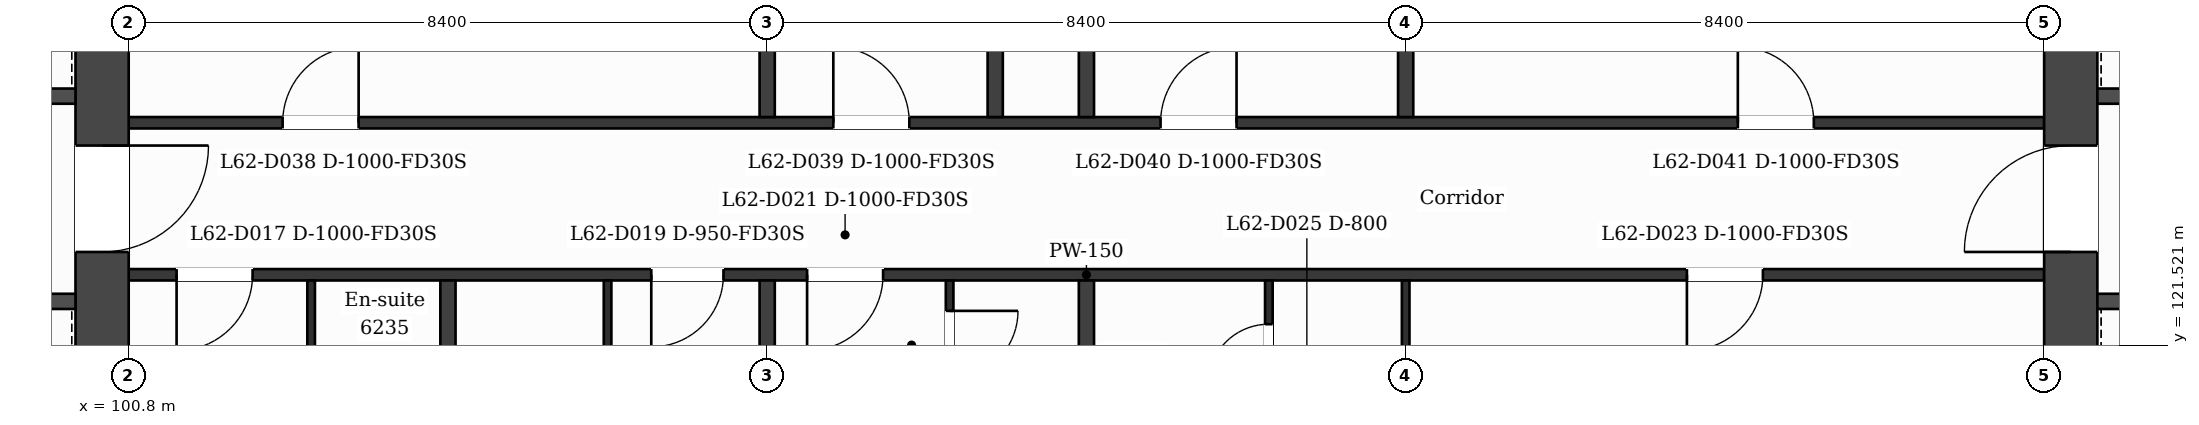
"""IFC4 building model, lengths in metres.
Left out: names, types, materials, properties, quantities, classifications, styles, units other than length and angle.
Written with IfcOpenShell. Run it as: python <this file> out.ifc"""

import sys

from ifc_helpers import new_model, si_unit, direction, frame, frame_2d, origin, place, context, subcontext, project, spatial, rectangle, extrude, element, fill, save


model = new_model("IFC4")
c1 = context("Model", 3, precision=1e-05, world=origin(), true_north=direction((0.0, 1.0)))
c2 = subcontext(c1, "Body", "Model", "MODEL_VIEW")
j1 = project(units=[si_unit("LENGTHUNIT", "METRE"), si_unit("PLANEANGLEUNIT", "RADIAN")], contexts=[c1])
p1 = place(None, origin())
s1 = spatial("IfcSite", under=j1, at=p1, CompositionType="ELEMENT")
p2 = place(p1, origin())
s2 = spatial("IfcBuilding", under=s1, at=p2, CompositionType="ELEMENT")
p3 = place(p2, frame((0.0, 0.0, 259.0)))
s3 = spatial("IfcBuildingStorey", under=s2, at=p3, CompositionType="ELEMENT", Elevation=259.0)
p4 = place(p3, frame((100.45, 132.05, 0.0), z_axis=(0.0, 0.0, 1.0), x_axis=(0.0, -1.0, 0.0)))
e1 = element("IfcWall", 1, at=p4, inside=s3, PredefinedType="SHEAR", context=c2, shape_type="SweptSolid", body=[
    extrude(rectangle(XDim=21.3, YDim=0.7, at=frame_2d((10.65, 0.0))), origin(), (0.0, 0.0, 1.0), 3.7),
])
p5 = place(p4, frame((7.9, 0.0, 0.0)))
e2 = element("IfcOpeningElement", 2, at=p5, cuts=e1, PredefinedType="OPENING", context=c2, shape_type="SweptSolid", body=[
    extrude(rectangle(XDim=1.4, YDim=2.1, at=frame_2d((0.7, 1.05))), frame((0.0, 0.36, 0.0), z_axis=(0.0, -1.0, 0.0), x_axis=(1.0, 0.0, 0.0)), (0.0, 0.0, 1.0), 0.72),
])
p6 = place(p3, frame((126.35, 110.75, 0.0), z_axis=(0.0, 0.0, 1.0), x_axis=(0.0, 1.0, 0.0)))
e3 = element("IfcWall", 3, at=p6, inside=s3, PredefinedType="SHEAR", context=c2, shape_type="SweptSolid", body=[
    extrude(rectangle(XDim=21.3, YDim=0.7, at=frame_2d((10.65, 0.0))), origin(), (0.0, 0.0, 1.0), 3.7),
])
p7 = place(p6, frame((12.0, 0.0, 0.0)))
e4 = element("IfcOpeningElement", 4, at=p7, cuts=e3, PredefinedType="OPENING", context=c2, shape_type="SweptSolid", body=[
    extrude(rectangle(XDim=1.4, YDim=2.1, at=frame_2d((0.7, 1.05))), frame((0.0, 0.36, 0.0), z_axis=(0.0, -1.0, 0.0), x_axis=(1.0, 0.0, 0.0)), (0.0, 0.0, 1.0), 0.72),
])
p8 = place(p3, frame((95.227, 122.1, 0.0), z_axis=(0.0, 0.0, 1.0), x_axis=(1.0, 0.0, 0.0)))
e5 = element("IfcWall", 5, at=p8, inside=s3, PredefinedType="PARTITIONING", context=c2, shape_type="SweptSolid", body=[
    extrude(rectangle(XDim=4.873, YDim=0.2, at=frame_2d((2.437, 0.0))), origin(), (0.0, 0.0, 1.0), 3.38),
])
p9 = place(p8, frame((0.827, 0.0, 0.0)))
e6 = element("IfcOpeningElement", 6, at=p9, cuts=e5, PredefinedType="OPENING", context=c2, shape_type="SweptSolid", body=[
    extrude(rectangle(XDim=1.1, YDim=2.1, at=frame_2d((0.55, 1.05))), frame((0.0, 0.11, 0.0), z_axis=(0.0, -1.0, 0.0), x_axis=(1.0, 0.0, 0.0)), (0.0, 0.0, 1.0), 0.22),
])
p10 = place(p8, frame((2.946, 0.0, 0.0)))
e7 = element("IfcOpeningElement", 7, at=p10, cuts=e5, PredefinedType="OPENING", context=c2, shape_type="SweptSolid", body=[
    extrude(rectangle(XDim=1.1, YDim=2.1, at=frame_2d((0.55, 1.05))), frame((0.0, 0.11, 0.0), z_axis=(0.0, -1.0, 0.0), x_axis=(1.0, 0.0, 0.0)), (0.0, 0.0, 1.0), 0.22),
])
p11 = place(p3, frame((126.7, 122.1, 0.0), z_axis=(0.0, 0.0, 1.0), x_axis=(1.0, 0.0, 0.0)))
e8 = element("IfcWall", 8, at=p11, inside=s3, PredefinedType="PARTITIONING", context=c2, shape_type="SweptSolid", body=[
    extrude(rectangle(XDim=4.873, YDim=0.2, at=frame_2d((2.437, 0.0))), origin(), (0.0, 0.0, 1.0), 3.38),
])
p12 = place(p11, frame((3.041, 0.0, 0.0)))
e9 = element("IfcOpeningElement", 9, at=p12, cuts=e8, PredefinedType="OPENING", context=c2, shape_type="SweptSolid", body=[
    extrude(rectangle(XDim=1.1, YDim=2.1, at=frame_2d((0.55, 1.05))), frame((0.0, 0.11, 0.0), z_axis=(0.0, -1.0, 0.0), x_axis=(1.0, 0.0, 0.0)), (0.0, 0.0, 1.0), 0.22),
])
p13 = place(p11, frame((0.732, 0.0, 0.0)))
e10 = element("IfcOpeningElement", 10, at=p13, cuts=e8, PredefinedType="OPENING", context=c2, shape_type="SweptSolid", body=[
    extrude(rectangle(XDim=1.1, YDim=2.1, at=frame_2d((0.55, 1.05))), frame((0.0, 0.11, 0.0), z_axis=(0.0, -1.0, 0.0), x_axis=(1.0, 0.0, 0.0)), (0.0, 0.0, 1.0), 0.22),
])
p14 = place(p3, frame((100.8, 122.45, 0.0), z_axis=(0.0, 0.0, 1.0), x_axis=(1.0, 0.0, 0.0)))
e11 = element("IfcWall", 11, at=p14, inside=s3, PredefinedType="PARTITIONING", context=c2, shape_type="SweptSolid", body=[
    extrude(rectangle(XDim=25.2, YDim=0.15, at=frame_2d((12.6, 0.0))), origin(), (0.0, 0.0, 1.0), 3.38),
])
p15 = place(p14, frame((0.63, 0.0, 0.0)))
e12 = element("IfcOpeningElement", 12, at=p15, cuts=e11, PredefinedType="OPENING", context=c2, shape_type="SweptSolid", body=[
    extrude(rectangle(XDim=1.0, YDim=2.1, at=frame_2d((0.5, 1.05))), frame((0.0, 0.085, 0.0), z_axis=(0.0, -1.0, 0.0), x_axis=(1.0, 0.0, 0.0)), (0.0, 0.0, 1.0), 0.17),
])
p16 = place(p14, frame((6.875, 0.0, 0.0)))
e13 = element("IfcOpeningElement", 13, at=p16, cuts=e11, PredefinedType="OPENING", context=c2, shape_type="SweptSolid", body=[
    extrude(rectangle(XDim=0.95, YDim=2.1, at=frame_2d((0.475, 1.05))), frame((0.0, 0.085, 0.0), z_axis=(0.0, -1.0, 0.0), x_axis=(1.0, 0.0, 0.0)), (0.0, 0.0, 1.0), 0.17),
])
p17 = place(p14, frame((8.925, 0.0, 0.0)))
e14 = element("IfcOpeningElement", 14, at=p17, cuts=e11, PredefinedType="OPENING", context=c2, shape_type="SweptSolid", body=[
    extrude(rectangle(XDim=1.0, YDim=2.1, at=frame_2d((0.5, 1.05))), frame((0.0, 0.085, 0.0), z_axis=(0.0, -1.0, 0.0), x_axis=(1.0, 0.0, 0.0)), (0.0, 0.0, 1.0), 0.17),
])
p18 = place(p14, frame((20.5, 0.0, 0.0)))
e15 = element("IfcOpeningElement", 15, at=p18, cuts=e11, PredefinedType="OPENING", context=c2, shape_type="SweptSolid", body=[
    extrude(rectangle(XDim=1.0, YDim=2.1, at=frame_2d((0.5, 1.05))), frame((0.0, 0.085, 0.0), z_axis=(0.0, -1.0, 0.0), x_axis=(1.0, 0.0, 0.0)), (0.0, 0.0, 1.0), 0.17),
])
p19 = place(p3, frame((100.8, 124.45, 0.0), z_axis=(0.0, 0.0, 1.0), x_axis=(1.0, 0.0, 0.0)))
e16 = element("IfcWall", 16, at=p19, inside=s3, PredefinedType="PARTITIONING", context=c2, shape_type="SweptSolid", body=[
    extrude(rectangle(XDim=25.2, YDim=0.15, at=frame_2d((12.6, 0.0))), origin(), (0.0, 0.0, 1.0), 3.38),
])
p20 = place(p19, frame((2.025, 0.0, 0.0)))
e17 = element("IfcOpeningElement", 17, at=p20, cuts=e16, PredefinedType="OPENING", context=c2, shape_type="SweptSolid", body=[
    extrude(rectangle(XDim=1.0, YDim=2.1, at=frame_2d((0.5, 1.05))), frame((0.0, 0.085, 0.0), z_axis=(0.0, -1.0, 0.0), x_axis=(1.0, 0.0, 0.0)), (0.0, 0.0, 1.0), 0.17),
])
p21 = place(p19, frame((9.27, 0.0, 0.0)))
e18 = element("IfcOpeningElement", 18, at=p21, cuts=e16, PredefinedType="OPENING", context=c2, shape_type="SweptSolid", body=[
    extrude(rectangle(XDim=1.0, YDim=2.1, at=frame_2d((0.5, 1.05))), frame((0.0, 0.085, 0.0), z_axis=(0.0, -1.0, 0.0), x_axis=(1.0, 0.0, 0.0)), (0.0, 0.0, 1.0), 0.17),
])
p22 = place(p19, frame((13.575, 0.0, 0.0)))
e19 = element("IfcOpeningElement", 19, at=p22, cuts=e16, PredefinedType="OPENING", context=c2, shape_type="SweptSolid", body=[
    extrude(rectangle(XDim=1.0, YDim=2.1, at=frame_2d((0.5, 1.05))), frame((0.0, 0.085, 0.0), z_axis=(0.0, -1.0, 0.0), x_axis=(1.0, 0.0, 0.0)), (0.0, 0.0, 1.0), 0.17),
])
p23 = place(p19, frame((21.17, 0.0, 0.0)))
e20 = element("IfcOpeningElement", 20, at=p23, cuts=e16, PredefinedType="OPENING", context=c2, shape_type="SweptSolid", body=[
    extrude(rectangle(XDim=1.0, YDim=2.1, at=frame_2d((0.5, 1.05))), frame((0.0, 0.085, 0.0), z_axis=(0.0, -1.0, 0.0), x_axis=(1.0, 0.0, 0.0)), (0.0, 0.0, 1.0), 0.17),
])
p24 = place(p3, frame((92.702, 124.8, 0.0), z_axis=(0.0, 0.0, 1.0), x_axis=(1.0, 0.0, 0.0)))
e21 = element("IfcWall", 21, at=p24, inside=s3, PredefinedType="PARTITIONING", context=c2, shape_type="SweptSolid", body=[
    extrude(rectangle(XDim=7.398, YDim=0.2, at=frame_2d((3.699, 0.0))), origin(), (0.0, 0.0, 1.0), 3.38),
])
p25 = place(p24, frame((5.636, 0.0, 0.0)))
e22 = element("IfcOpeningElement", 22, at=p25, cuts=e21, PredefinedType="OPENING", context=c2, shape_type="SweptSolid", body=[
    extrude(rectangle(XDim=1.1, YDim=2.1, at=frame_2d((0.55, 1.05))), frame((0.0, 0.11, 0.0), z_axis=(0.0, -1.0, 0.0), x_axis=(1.0, 0.0, 0.0)), (0.0, 0.0, 1.0), 0.22),
])
p26 = place(p3, frame((126.7, 124.8, 0.0), z_axis=(0.0, 0.0, 1.0), x_axis=(1.0, 0.0, 0.0)))
e23 = element("IfcWall", 23, at=p26, inside=s3, PredefinedType="PARTITIONING", context=c2, shape_type="SweptSolid", body=[
    extrude(rectangle(XDim=4.849, YDim=0.2, at=frame_2d((2.424, 0.0))), origin(), (0.0, 0.0, 1.0), 3.38),
])
p27 = place(p26, frame((0.506, 0.0, 0.0)))
e24 = element("IfcOpeningElement", 24, at=p27, cuts=e23, PredefinedType="OPENING", context=c2, shape_type="SweptSolid", body=[
    extrude(rectangle(XDim=1.1, YDim=2.1, at=frame_2d((0.55, 1.05))), frame((0.0, 0.11, 0.0), z_axis=(0.0, -1.0, 0.0), x_axis=(1.0, 0.0, 0.0)), (0.0, 0.0, 1.0), 0.22),
])
p28 = place(p3, frame((103.2, 119.8, 0.0), z_axis=(0.0, 0.0, 1.0), x_axis=(0.0, 1.0, 0.0)))
e25 = element("IfcWall", 25, at=p28, inside=s3, PredefinedType="PARTITIONING", context=c2, shape_type="SweptSolid", body=[
    extrude(rectangle(XDim=2.575, YDim=0.1, at=frame_2d((1.288, 0.0))), origin(), (0.0, 0.0, 1.0), 3.38),
])
p29 = place(p28, frame((0.74, 0.0, 0.0)))
e26 = element("IfcOpeningElement", 26, at=p29, cuts=e25, PredefinedType="OPENING", context=c2, shape_type="SweptSolid", body=[
    extrude(rectangle(XDim=0.9, YDim=2.1, at=frame_2d((0.45, 1.05))), frame((0.0, 0.06, 0.0), z_axis=(0.0, -1.0, 0.0), x_axis=(1.0, 0.0, 0.0)), (0.0, 0.0, 1.0), 0.12),
])
p30 = place(p3, frame((105.0, 110.55, 0.0), z_axis=(0.0, 0.0, 1.0), x_axis=(0.0, 1.0, 0.0)))
e27 = element("IfcWall", 27, at=p30, inside=s3, PredefinedType="PARTITIONING", context=c2, shape_type="SweptSolid", body=[
    extrude(rectangle(XDim=11.825, YDim=0.2, at=frame_2d((5.913, 0.0))), origin(), (0.0, 0.0, 1.0), 3.38),
])
p31 = place(p3, frame((107.1, 119.8, 0.0), z_axis=(0.0, 0.0, 1.0), x_axis=(0.0, 1.0, 0.0)))
e28 = element("IfcWall", 28, at=p31, inside=s3, PredefinedType="PARTITIONING", context=c2, shape_type="SweptSolid", body=[
    extrude(rectangle(XDim=2.575, YDim=0.1, at=frame_2d((1.288, 0.0))), origin(), (0.0, 0.0, 1.0), 3.38),
])
p32 = place(p31, frame((0.9, 0.0, 0.0)))
e29 = element("IfcOpeningElement", 29, at=p32, cuts=e28, PredefinedType="OPENING", context=c2, shape_type="SweptSolid", body=[
    extrude(rectangle(XDim=0.8, YDim=2.1, at=frame_2d((0.4, 1.05))), frame((0.0, 0.06, 0.0), z_axis=(0.0, -1.0, 0.0), x_axis=(1.0, 0.0, 0.0)), (0.0, 0.0, 1.0), 0.12),
])
p33 = place(p3, frame((109.2, 110.55, 0.0), z_axis=(0.0, 0.0, 1.0), x_axis=(0.0, 1.0, 0.0)))
e30 = element("IfcWall", 30, at=p33, inside=s3, PredefinedType="PARTITIONING", context=c2, shape_type="SweptSolid", body=[
    extrude(rectangle(XDim=11.825, YDim=0.2, at=frame_2d((5.913, 0.0))), origin(), (0.0, 0.0, 1.0), 3.38),
])
p34 = place(p3, frame((109.2, 124.525, 0.0), z_axis=(0.0, 0.0, 1.0), x_axis=(0.0, 1.0, 0.0)))
e31 = element("IfcWall", 31, at=p34, inside=s3, PredefinedType="PARTITIONING", context=c2, shape_type="SweptSolid", body=[
    extrude(rectangle(XDim=9.2, YDim=0.2, at=frame_2d((4.6, 0.0))), origin(), (0.0, 0.0, 1.0), 3.38),
])
p35 = place(p3, frame((111.6, 120.4, 0.0), z_axis=(0.0, 0.0, 1.0), x_axis=(0.0, 1.0, 0.0)))
e32 = element("IfcWall", 32, at=p35, inside=s3, PredefinedType="PARTITIONING", context=c2, shape_type="SweptSolid", body=[
    extrude(rectangle(XDim=1.975, YDim=0.1, at=frame_2d((0.988, 0.0))), origin(), (0.0, 0.0, 1.0), 3.38),
])
p36 = place(p35, frame((0.675, 0.0, 0.0)))
e33 = element("IfcOpeningElement", 33, at=p36, cuts=e32, PredefinedType="OPENING", context=c2, shape_type="SweptSolid", body=[
    extrude(rectangle(XDim=0.9, YDim=2.1, at=frame_2d((0.45, 1.05))), frame((0.0, 0.06, 0.0), z_axis=(0.0, -1.0, 0.0), x_axis=(1.0, 0.0, 0.0)), (0.0, 0.0, 1.0), 0.12),
])
p37 = place(p3, frame((112.2, 124.525, 0.0), z_axis=(0.0, 0.0, 1.0), x_axis=(0.0, 1.0, 0.0)))
e34 = element("IfcWall", 34, at=p37, inside=s3, PredefinedType="PARTITIONING", context=c2, shape_type="SweptSolid", body=[
    extrude(rectangle(XDim=5.825, YDim=0.2, at=frame_2d((2.913, 0.0))), origin(), (0.0, 0.0, 1.0), 3.38),
])
p38 = place(p3, frame((113.4, 110.55, 0.0), z_axis=(0.0, 0.0, 1.0), x_axis=(0.0, 1.0, 0.0)))
e35 = element("IfcWall", 35, at=p38, inside=s3, PredefinedType="PARTITIONING", context=c2, shape_type="SweptSolid", body=[
    extrude(rectangle(XDim=11.825, YDim=0.2, at=frame_2d((5.913, 0.0))), origin(), (0.0, 0.0, 1.0), 3.38),
])
p39 = place(p3, frame((113.4, 124.525, 0.0), z_axis=(0.0, 0.0, 1.0), x_axis=(0.0, 1.0, 0.0)))
e36 = element("IfcWall", 36, at=p39, inside=s3, PredefinedType="PARTITIONING", context=c2, shape_type="SweptSolid", body=[
    extrude(rectangle(XDim=9.2, YDim=0.2, at=frame_2d((4.6, 0.0))), origin(), (0.0, 0.0, 1.0), 3.38),
])
p40 = place(p3, frame((115.8, 119.8, 0.0), z_axis=(0.0, 0.0, 1.0), x_axis=(0.0, 1.0, 0.0)))
e37 = element("IfcWall", 37, at=p40, inside=s3, PredefinedType="PARTITIONING", context=c2, shape_type="SweptSolid", body=[
    extrude(rectangle(XDim=2.575, YDim=0.1, at=frame_2d((1.288, 0.0))), origin(), (0.0, 0.0, 1.0), 3.38),
])
p41 = place(p40, frame((1.2, 0.0, 0.0)))
e38 = element("IfcOpeningElement", 38, at=p41, cuts=e37, PredefinedType="OPENING", context=c2, shape_type="SweptSolid", body=[
    extrude(rectangle(XDim=0.8, YDim=2.1, at=frame_2d((0.4, 1.05))), frame((0.0, 0.06, 0.0), z_axis=(0.0, -1.0, 0.0), x_axis=(1.0, 0.0, 0.0)), (0.0, 0.0, 1.0), 0.12),
])
p42 = place(p3, frame((117.6, 110.55, 0.0), z_axis=(0.0, 0.0, 1.0), x_axis=(0.0, 1.0, 0.0)))
e39 = element("IfcWall", 39, at=p42, inside=s3, PredefinedType="PARTITIONING", context=c2, shape_type="SweptSolid", body=[
    extrude(rectangle(XDim=11.825, YDim=0.1, at=frame_2d((5.913, 0.0))), origin(), (0.0, 0.0, 1.0), 3.38),
])
p43 = place(p42, frame((9.09, 0.0, 0.0)))
e40 = element("IfcOpeningElement", 40, at=p43, cuts=e39, PredefinedType="OPENING", context=c2, shape_type="SweptSolid", body=[
    extrude(rectangle(XDim=0.9, YDim=2.1, at=frame_2d((0.45, 1.05))), frame((0.0, 0.06, 0.0), z_axis=(0.0, -1.0, 0.0), x_axis=(1.0, 0.0, 0.0)), (0.0, 0.0, 1.0), 0.12),
])
p44 = place(p3, frame((117.6, 124.525, 0.0), z_axis=(0.0, 0.0, 1.0), x_axis=(0.0, 1.0, 0.0)))
e41 = element("IfcWall", 41, at=p44, inside=s3, PredefinedType="PARTITIONING", context=c2, shape_type="SweptSolid", body=[
    extrude(rectangle(XDim=9.2, YDim=0.2, at=frame_2d((4.6, 0.0))), origin(), (0.0, 0.0, 1.0), 3.38),
])
p45 = place(p15, origin())
e42 = element("IfcDoor", 42, at=p45, inside=s3, OperationType="SINGLE_SWING_LEFT", PredefinedType="DOOR", context=c2, shape_type="SweptSolid", body=[
    extrude(rectangle(XDim=1.0, YDim=2.1, at=frame_2d((0.5, 1.05))), frame((0.0, 0.025, 0.0), z_axis=(0.0, -1.0, 0.0), x_axis=(1.0, 0.0, 0.0)), (0.0, 0.0, 1.0), 0.05),
])
fill(e12, e42)
p46 = place(p16, origin())
e43 = element("IfcDoor", 43, at=p46, inside=s3, OperationType="SINGLE_SWING_LEFT", PredefinedType="DOOR", context=c2, shape_type="SweptSolid", body=[
    extrude(rectangle(XDim=0.95, YDim=2.1, at=frame_2d((0.475, 1.05))), frame((0.0, 0.025, 0.0), z_axis=(0.0, -1.0, 0.0), x_axis=(1.0, 0.0, 0.0)), (0.0, 0.0, 1.0), 0.05),
])
fill(e13, e43)
p47 = place(p17, origin())
e44 = element("IfcDoor", 44, at=p47, inside=s3, OperationType="SINGLE_SWING_LEFT", PredefinedType="DOOR", context=c2, shape_type="SweptSolid", body=[
    extrude(rectangle(XDim=1.0, YDim=2.1, at=frame_2d((0.5, 1.05))), frame((0.0, 0.025, 0.0), z_axis=(0.0, -1.0, 0.0), x_axis=(1.0, 0.0, 0.0)), (0.0, 0.0, 1.0), 0.05),
])
fill(e14, e44)
p48 = place(p36, origin())
e45 = element("IfcDoor", 45, at=p48, inside=s3, OperationType="SINGLE_SWING_RIGHT", PredefinedType="DOOR", context=c2, shape_type="SweptSolid", body=[
    extrude(rectangle(XDim=0.9, YDim=2.1, at=frame_2d((0.45, 1.05))), frame((0.0, 0.025, 0.0), z_axis=(0.0, -1.0, 0.0), x_axis=(1.0, 0.0, 0.0)), (0.0, 0.0, 1.0), 0.05),
])
fill(e33, e45)
p49 = place(p18, origin())
e46 = element("IfcDoor", 46, at=p49, inside=s3, OperationType="SINGLE_SWING_LEFT", PredefinedType="DOOR", context=c2, shape_type="SweptSolid", body=[
    extrude(rectangle(XDim=1.0, YDim=2.1, at=frame_2d((0.5, 1.05))), frame((0.0, 0.025, 0.0), z_axis=(0.0, -1.0, 0.0), x_axis=(1.0, 0.0, 0.0)), (0.0, 0.0, 1.0), 0.05),
])
fill(e15, e46)
p50 = place(p41, origin())
e47 = element("IfcDoor", 47, at=p50, inside=s3, OperationType="SINGLE_SWING_LEFT", PredefinedType="DOOR", context=c2, shape_type="SweptSolid", body=[
    extrude(rectangle(XDim=0.8, YDim=2.1, at=frame_2d((0.4, 1.05))), frame((0.0, 0.025, 0.0), z_axis=(0.0, -1.0, 0.0), x_axis=(1.0, 0.0, 0.0)), (0.0, 0.0, 1.0), 0.05),
])
fill(e38, e47)
p51 = place(p20, origin())
e48 = element("IfcDoor", 48, at=p51, inside=s3, OperationType="SINGLE_SWING_RIGHT", PredefinedType="DOOR", context=c2, shape_type="SweptSolid", body=[
    extrude(rectangle(XDim=1.0, YDim=2.1, at=frame_2d((0.5, 1.05))), frame((0.0, 0.025, 0.0), z_axis=(0.0, -1.0, 0.0), x_axis=(1.0, 0.0, 0.0)), (0.0, 0.0, 1.0), 0.05),
])
fill(e17, e48)
p52 = place(p21, origin())
e49 = element("IfcDoor", 49, at=p52, inside=s3, OperationType="SINGLE_SWING_LEFT", PredefinedType="DOOR", context=c2, shape_type="SweptSolid", body=[
    extrude(rectangle(XDim=1.0, YDim=2.1, at=frame_2d((0.5, 1.05))), frame((0.0, 0.025, 0.0), z_axis=(0.0, -1.0, 0.0), x_axis=(1.0, 0.0, 0.0)), (0.0, 0.0, 1.0), 0.05),
])
fill(e18, e49)
p53 = place(p22, origin())
e50 = element("IfcDoor", 50, at=p53, inside=s3, OperationType="SINGLE_SWING_RIGHT", PredefinedType="DOOR", context=c2, shape_type="SweptSolid", body=[
    extrude(rectangle(XDim=1.0, YDim=2.1, at=frame_2d((0.5, 1.05))), frame((0.0, 0.025, 0.0), z_axis=(0.0, -1.0, 0.0), x_axis=(1.0, 0.0, 0.0)), (0.0, 0.0, 1.0), 0.05),
])
fill(e19, e50)
p54 = place(p23, origin())
e51 = element("IfcDoor", 51, at=p54, inside=s3, OperationType="SINGLE_SWING_LEFT", PredefinedType="DOOR", context=c2, shape_type="SweptSolid", body=[
    extrude(rectangle(XDim=1.0, YDim=2.1, at=frame_2d((0.5, 1.05))), frame((0.0, 0.025, 0.0), z_axis=(0.0, -1.0, 0.0), x_axis=(1.0, 0.0, 0.0)), (0.0, 0.0, 1.0), 0.05),
])
fill(e20, e51)
p55 = place(p5, origin())
e52 = element("IfcDoor", 52, at=p55, inside=s3, OperationType="SINGLE_SWING_LEFT", PredefinedType="DOOR", context=c2, shape_type="SweptSolid", body=[
    extrude(rectangle(XDim=1.4, YDim=2.1, at=frame_2d((0.7, 1.05))), frame((0.0, 0.025, 0.0), z_axis=(0.0, -1.0, 0.0), x_axis=(1.0, 0.0, 0.0)), (0.0, 0.0, 1.0), 0.05),
])
fill(e2, e52)
p56 = place(p7, origin())
e53 = element("IfcDoor", 53, at=p56, inside=s3, OperationType="SINGLE_SWING_LEFT", PredefinedType="DOOR", context=c2, shape_type="SweptSolid", body=[
    extrude(rectangle(XDim=1.4, YDim=2.1, at=frame_2d((0.7, 1.05))), frame((0.0, 0.025, 0.0), z_axis=(0.0, -1.0, 0.0), x_axis=(1.0, 0.0, 0.0)), (0.0, 0.0, 1.0), 0.05),
])
fill(e4, e53)
save(model, sys.argv[1])
